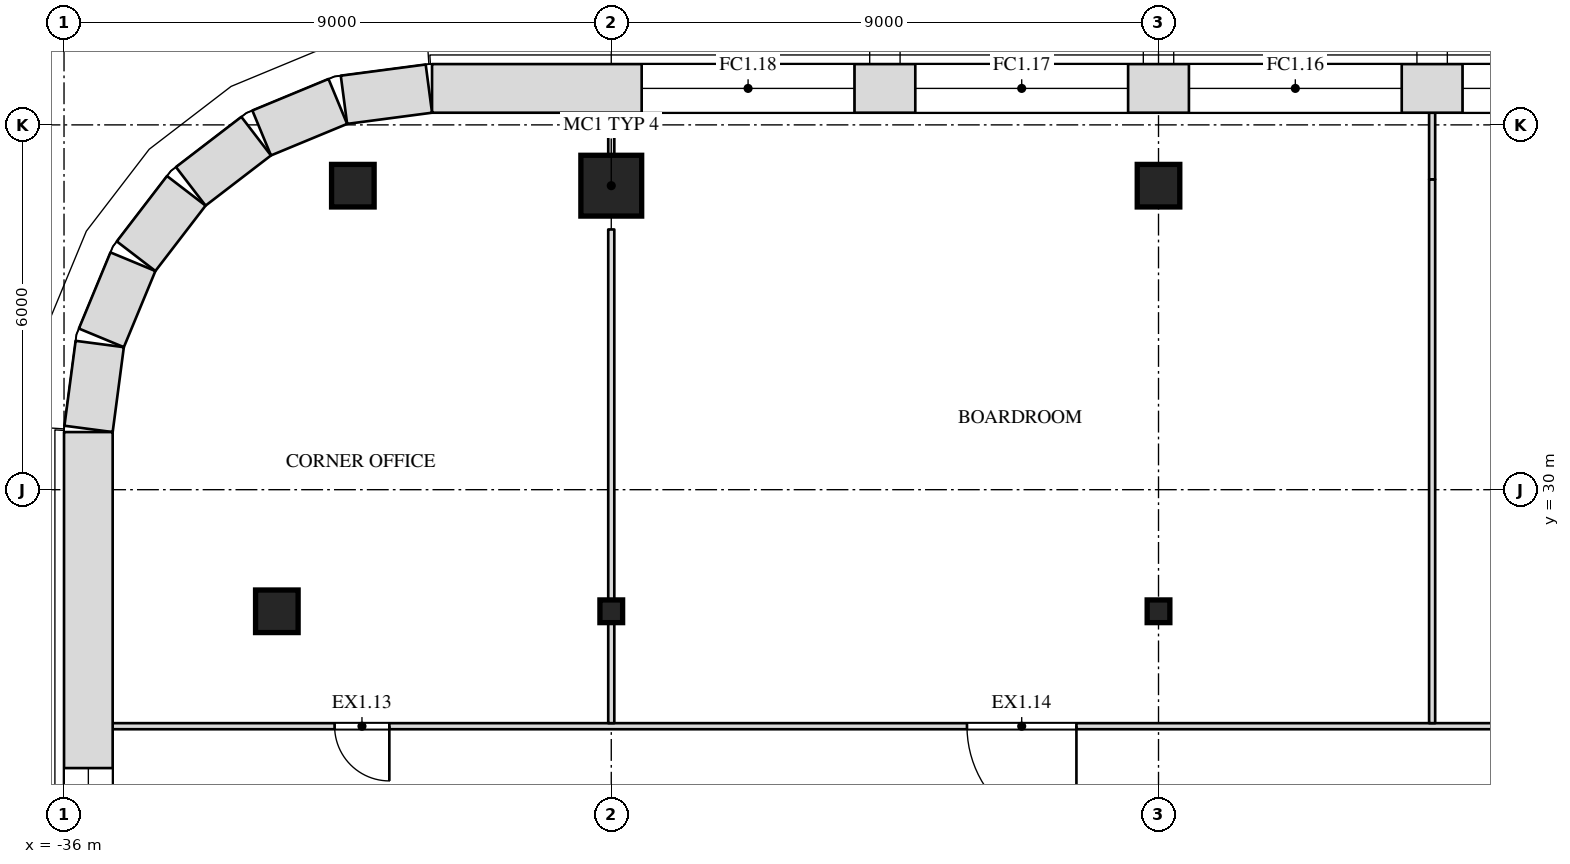
"""IFC4 building model, lengths in metres.
Left out: names, types, materials, properties, quantities, classifications, styles, units other than length and angle.
Written with IfcOpenShell. Run it as: python <this file> out.ifc"""

import sys

from ifc_helpers import new_model, si_unit, direction, frame, frame_2d, origin, origin_2d, place, context, subcontext, project, spatial, rectangle, i_section, extrude, element, fill, save


model = new_model("IFC4")
c1 = context("Model", 3, precision=1e-05, world=origin(), true_north=direction((0.0, 1.0)))
c2 = subcontext(c1, "Body", "Model", "MODEL_VIEW")
j1 = project(units=[si_unit("LENGTHUNIT", "METRE"), si_unit("PLANEANGLEUNIT", "RADIAN")], contexts=[c1])
p1 = place(None, origin())
s1 = spatial("IfcSite", under=j1, at=p1, CompositionType="ELEMENT")
p2 = place(p1, origin())
s2 = spatial("IfcBuilding", under=s1, at=p2, CompositionType="ELEMENT")
p3 = place(p2, frame((0.0, 0.0, 272.5)))
s3 = spatial("IfcBuildingStorey", under=s2, at=p3, CompositionType="ELEMENT", Elevation=272.5)
p4 = place(p3, frame((-32.5, 28.0, 0.0), z_axis=(0.0, 0.0, 1.0), x_axis=(1.0, 0.0, 0.0)))
e1 = element("IfcColumn", 1, at=p4, inside=s3, PredefinedType="COLUMN", context=c2, shape_type="SweptSolid", body=[
    extrude(rectangle(XDim=0.7, YDim=0.7, at=origin_2d()), origin(), (0.0, 0.0, 1.0), 4.0),
])
for number, where, z_axis, x_axis in (
    (2, (-27.0, 28.0, 0.0), (0.0, 0.0, 1.0), (1.0, 0.0, 0.0)),
    (3, (-18.0, 28.0, 0.0), (0.0, 0.0, 1.0), (1.0, 0.0, 0.0)),
):
    element("IfcColumn", number, at=place(p3, frame(where, z_axis=z_axis, x_axis=x_axis)), inside=s3, PredefinedType="COLUMN", context=c2, shape_type="SweptSolid", body=[
        extrude(i_section(OverallWidth=0.373, OverallDepth=0.373, WebThickness=0.016, FlangeThickness=0.026, at=origin_2d()), origin(), (0.0, 0.0, 1.0), 4.0),
    ])
p5 = place(p3, frame((-31.25, 35.0, 0.0), z_axis=(0.0, 0.0, 1.0), x_axis=(1.0, 0.0, 0.0)))
e4 = element("IfcColumn", 4, at=p5, inside=s3, PredefinedType="COLUMN", context=c2, shape_type="SweptSolid", body=[
    extrude(rectangle(XDim=0.7, YDim=0.7, at=origin_2d()), origin(), (0.0, 0.0, 1.0), 4.0),
])
p6 = place(p3, frame((-27.0, 35.0, 0.0), z_axis=(0.0, 0.0, 1.0), x_axis=(1.0, 0.0, 0.0)))
e5 = element("IfcColumn", 5, at=p6, inside=s3, PredefinedType="COLUMN", context=c2, shape_type="SweptSolid", body=[
    extrude(rectangle(XDim=1.0, YDim=1.0, at=origin_2d()), origin(), (0.0, 0.0, 1.0), 4.0),
])
p7 = place(p3, frame((-18.0, 35.0, 0.0), z_axis=(0.0, 0.0, 1.0), x_axis=(1.0, 0.0, 0.0)))
e6 = element("IfcColumn", 6, at=p7, inside=s3, PredefinedType="COLUMN", context=c2, shape_type="SweptSolid", body=[
    extrude(rectangle(XDim=0.7, YDim=0.7, at=origin_2d()), origin(), (0.0, 0.0, 1.0), 4.0),
])
p8 = place(p3, frame((-35.2, 26.11, 0.0), z_axis=(0.0, 0.0, 1.0), x_axis=(1.0, 0.0, 0.0)))
e7 = element("IfcWall", 7, at=p8, inside=s3, PredefinedType="PARTITIONING", context=c2, shape_type="SweptSolid", body=[
    extrude(rectangle(XDim=70.4, YDim=0.1, at=frame_2d((35.2, 0.0))), origin(), (0.0, 0.0, 1.0), 3.78),
])
p9 = place(p8, frame((3.65, 0.0, 0.0)))
e8 = element("IfcOpeningElement", 8, at=p9, cuts=e7, PredefinedType="OPENING", context=c2, shape_type="SweptSolid", body=[
    extrude(rectangle(XDim=0.9, YDim=2.1, at=frame_2d((0.45, 1.05))), frame((0.0, 0.062, 0.0), z_axis=(0.0, -1.0, 0.0), x_axis=(1.0, 0.0, 0.0)), (0.0, 0.0, 1.0), 0.124),
])
p10 = place(p8, frame((14.05, 0.0, 0.0)))
e9 = element("IfcOpeningElement", 9, at=p10, cuts=e7, PredefinedType="OPENING", context=c2, shape_type="SweptSolid", body=[
    extrude(rectangle(XDim=1.8, YDim=2.1, at=frame_2d((0.9, 1.05))), frame((0.0, 0.062, 0.0), z_axis=(0.0, -1.0, 0.0), x_axis=(1.0, 0.0, 0.0)), (0.0, 0.0, 1.0), 0.124),
])
p11 = place(p8, frame((28.0, 0.0, 0.0)))
e10 = element("IfcOpeningElement", 10, at=p11, cuts=e7, PredefinedType="OPENING", context=c2, shape_type="SweptSolid", body=[
    extrude(rectangle(XDim=0.9, YDim=2.1, at=frame_2d((0.45, 1.05))), frame((0.0, 0.062, 0.0), z_axis=(0.0, -1.0, 0.0), x_axis=(1.0, 0.0, 0.0)), (0.0, 0.0, 1.0), 0.124),
])
p12 = place(p8, frame((41.5, 0.0, 0.0)))
e11 = element("IfcOpeningElement", 11, at=p12, cuts=e7, PredefinedType="OPENING", context=c2, shape_type="SweptSolid", body=[
    extrude(rectangle(XDim=0.9, YDim=2.1, at=frame_2d((0.45, 1.05))), frame((0.0, 0.062, 0.0), z_axis=(0.0, -1.0, 0.0), x_axis=(1.0, 0.0, 0.0)), (0.0, 0.0, 1.0), 0.124),
])
p13 = place(p8, frame((54.55, 0.0, 0.0)))
e12 = element("IfcOpeningElement", 12, at=p13, cuts=e7, PredefinedType="OPENING", context=c2, shape_type="SweptSolid", body=[
    extrude(rectangle(XDim=1.8, YDim=2.1, at=frame_2d((0.9, 1.05))), frame((0.0, 0.062, 0.0), z_axis=(0.0, -1.0, 0.0), x_axis=(1.0, 0.0, 0.0)), (0.0, 0.0, 1.0), 0.124),
])
p14 = place(p8, frame((65.85, 0.0, 0.0)))
e13 = element("IfcOpeningElement", 13, at=p14, cuts=e7, PredefinedType="OPENING", context=c2, shape_type="SweptSolid", body=[
    extrude(rectangle(XDim=0.9, YDim=2.1, at=frame_2d((0.45, 1.05))), frame((0.0, 0.062, 0.0), z_axis=(0.0, -1.0, 0.0), x_axis=(1.0, 0.0, 0.0)), (0.0, 0.0, 1.0), 0.124),
])
p15 = place(p3, frame((-27.0, 26.16, 0.0), z_axis=(0.0, 0.0, 1.0), x_axis=(0.0, 1.0, 0.0)))
e14 = element("IfcWall", 14, at=p15, inside=s3, PredefinedType="PARTITIONING", context=c2, shape_type="SweptSolid", body=[
    extrude(rectangle(XDim=1.653, YDim=0.1, at=frame_2d((0.827, 0.0))), origin(), (0.0, 0.0, 1.0), 3.247),
])
p16 = place(p3, frame((-27.0, 28.187, 0.0), z_axis=(0.0, 0.0, 1.0), x_axis=(0.0, 1.0, 0.0)))
e15 = element("IfcWall", 15, at=p16, inside=s3, PredefinedType="PARTITIONING", context=c2, shape_type="SweptSolid", body=[
    extrude(rectangle(XDim=6.093, YDim=0.1, at=frame_2d((3.047, 0.0))), origin(), (0.0, 0.0, 1.0), 3.247),
])
p17 = place(p3, frame((-13.5, 26.16, 0.0), z_axis=(0.0, 0.0, 1.0), x_axis=(0.0, 1.0, 0.0)))
e16 = element("IfcWall", 16, at=p17, inside=s3, PredefinedType="PARTITIONING", context=c2, shape_type="SweptSolid", body=[
    extrude(rectangle(XDim=8.945, YDim=0.1, at=frame_2d((4.472, 0.0))), origin(), (0.0, 0.0, 1.0), 3.247),
])
p18 = place(p3, frame((-13.5, 35.104, 0.0), z_axis=(0.0, 0.0, 1.0), x_axis=(0.0, 1.0, 0.0)))
e17 = element("IfcWall", 17, at=p18, inside=s3, PredefinedType="PARTITIONING", context=c2, shape_type="SweptSolid", body=[
    extrude(rectangle(XDim=1.095, YDim=0.1, at=frame_2d((0.548, 0.0))), origin(), (0.0, 0.0, 1.0), 3.78),
])
p19 = place(p3, frame((-27.0, 35.5, 0.0), z_axis=(0.0, 0.0, 1.0), x_axis=(0.0, 1.0, 0.0)))
e18 = element("IfcWall", 18, at=p19, inside=s3, PredefinedType="PARTITIONING", context=c2, shape_type="SweptSolid", body=[
    extrude(rectangle(XDim=0.7, YDim=0.1, at=frame_2d((0.35, 0.0))), origin(), (0.0, 0.0, 1.0), 3.78),
])
p20 = place(p3, frame((29.948, 36.6, 0.0), z_axis=(0.0, 0.0, 1.0), x_axis=(-1.0, 0.0, 0.0)))
e19 = element("IfcWall", 19, at=p20, inside=s3, PredefinedType="SOLIDWALL", context=c2, shape_type="SweptSolid", body=[
    extrude(rectangle(XDim=59.895, YDim=0.8, at=frame_2d((29.948, 0.0))), origin(), (0.0, 0.0, 1.0), 3.78),
])
p21 = place(p20, frame((3.448, 0.0, 1.0)))
e20 = element("IfcOpeningElement", 20, at=p21, cuts=e19, PredefinedType="OPENING", context=c2, shape_type="SweptSolid", body=[
    extrude(rectangle(XDim=3.5, YDim=2.5, at=frame_2d((1.75, 1.25))), frame((0.0, 0.412, 0.0), z_axis=(0.0, -1.0, 0.0), x_axis=(1.0, 0.0, 0.0)), (0.0, 0.0, 1.0), 0.824),
])
p22 = place(p20, frame((7.948, 0.0, 1.0)))
e21 = element("IfcOpeningElement", 21, at=p22, cuts=e19, PredefinedType="OPENING", context=c2, shape_type="SweptSolid", body=[
    extrude(rectangle(XDim=3.5, YDim=2.5, at=frame_2d((1.75, 1.25))), frame((0.0, 0.412, 0.0), z_axis=(0.0, -1.0, 0.0), x_axis=(1.0, 0.0, 0.0)), (0.0, 0.0, 1.0), 0.824),
])
p23 = place(p20, frame((12.448, 0.0, 1.0)))
e22 = element("IfcOpeningElement", 22, at=p23, cuts=e19, PredefinedType="OPENING", context=c2, shape_type="SweptSolid", body=[
    extrude(rectangle(XDim=3.5, YDim=2.5, at=frame_2d((1.75, 1.25))), frame((0.0, 0.412, 0.0), z_axis=(0.0, -1.0, 0.0), x_axis=(1.0, 0.0, 0.0)), (0.0, 0.0, 1.0), 0.824),
])
p24 = place(p20, frame((16.948, 0.0, 1.0)))
e23 = element("IfcOpeningElement", 23, at=p24, cuts=e19, PredefinedType="OPENING", context=c2, shape_type="SweptSolid", body=[
    extrude(rectangle(XDim=3.5, YDim=2.5, at=frame_2d((1.75, 1.25))), frame((0.0, 0.412, 0.0), z_axis=(0.0, -1.0, 0.0), x_axis=(1.0, 0.0, 0.0)), (0.0, 0.0, 1.0), 0.824),
])
p25 = place(p20, frame((21.448, 0.0, 1.0)))
e24 = element("IfcOpeningElement", 24, at=p25, cuts=e19, PredefinedType="OPENING", context=c2, shape_type="SweptSolid", body=[
    extrude(rectangle(XDim=3.5, YDim=2.5, at=frame_2d((1.75, 1.25))), frame((0.0, 0.412, 0.0), z_axis=(0.0, -1.0, 0.0), x_axis=(1.0, 0.0, 0.0)), (0.0, 0.0, 1.0), 0.824),
])
p26 = place(p20, frame((25.948, 0.0, 1.0)))
e25 = element("IfcOpeningElement", 25, at=p26, cuts=e19, PredefinedType="OPENING", context=c2, shape_type="SweptSolid", body=[
    extrude(rectangle(XDim=3.5, YDim=2.5, at=frame_2d((1.75, 1.25))), frame((0.0, 0.412, 0.0), z_axis=(0.0, -1.0, 0.0), x_axis=(1.0, 0.0, 0.0)), (0.0, 0.0, 1.0), 0.824),
])
p27 = place(p20, frame((30.448, 0.0, 1.0)))
e26 = element("IfcOpeningElement", 26, at=p27, cuts=e19, PredefinedType="OPENING", context=c2, shape_type="SweptSolid", body=[
    extrude(rectangle(XDim=3.5, YDim=2.5, at=frame_2d((1.75, 1.25))), frame((0.0, 0.412, 0.0), z_axis=(0.0, -1.0, 0.0), x_axis=(1.0, 0.0, 0.0)), (0.0, 0.0, 1.0), 0.824),
])
p28 = place(p20, frame((34.948, 0.0, 1.0)))
e27 = element("IfcOpeningElement", 27, at=p28, cuts=e19, PredefinedType="OPENING", context=c2, shape_type="SweptSolid", body=[
    extrude(rectangle(XDim=3.5, YDim=2.5, at=frame_2d((1.75, 1.25))), frame((0.0, 0.412, 0.0), z_axis=(0.0, -1.0, 0.0), x_axis=(1.0, 0.0, 0.0)), (0.0, 0.0, 1.0), 0.824),
])
p29 = place(p20, frame((39.448, 0.0, 1.0)))
e28 = element("IfcOpeningElement", 28, at=p29, cuts=e19, PredefinedType="OPENING", context=c2, shape_type="SweptSolid", body=[
    extrude(rectangle(XDim=3.5, YDim=2.5, at=frame_2d((1.75, 1.25))), frame((0.0, 0.412, 0.0), z_axis=(0.0, -1.0, 0.0), x_axis=(1.0, 0.0, 0.0)), (0.0, 0.0, 1.0), 0.824),
])
p30 = place(p20, frame((43.948, 0.0, 1.0)))
e29 = element("IfcOpeningElement", 29, at=p30, cuts=e19, PredefinedType="OPENING", context=c2, shape_type="SweptSolid", body=[
    extrude(rectangle(XDim=3.5, YDim=2.5, at=frame_2d((1.75, 1.25))), frame((0.0, 0.412, 0.0), z_axis=(0.0, -1.0, 0.0), x_axis=(1.0, 0.0, 0.0)), (0.0, 0.0, 1.0), 0.824),
])
p31 = place(p20, frame((48.448, 0.0, 1.0)))
e30 = element("IfcOpeningElement", 30, at=p31, cuts=e19, PredefinedType="OPENING", context=c2, shape_type="SweptSolid", body=[
    extrude(rectangle(XDim=3.5, YDim=2.5, at=frame_2d((1.75, 1.25))), frame((0.0, 0.412, 0.0), z_axis=(0.0, -1.0, 0.0), x_axis=(1.0, 0.0, 0.0)), (0.0, 0.0, 1.0), 0.824),
])
p32 = place(p20, frame((52.948, 0.0, 1.0)))
e31 = element("IfcOpeningElement", 31, at=p32, cuts=e19, PredefinedType="OPENING", context=c2, shape_type="SweptSolid", body=[
    extrude(rectangle(XDim=3.5, YDim=2.5, at=frame_2d((1.75, 1.25))), frame((0.0, 0.412, 0.0), z_axis=(0.0, -1.0, 0.0), x_axis=(1.0, 0.0, 0.0)), (0.0, 0.0, 1.0), 0.824),
])
p33 = place(p3, frame((-30.0, 36.597, 0.0), z_axis=(0.0, 0.0, 1.0), x_axis=(-0.99144603414, -0.130517283865, 0.0)))
e32 = element("IfcWall", 32, at=p33, inside=s3, PredefinedType="SOLIDWALL", context=c2, shape_type="SweptSolid", body=[
    extrude(rectangle(XDim=1.408, YDim=0.8, at=frame_2d((0.704, 0.0))), origin(), (0.0, 0.0, 1.0), 3.78),
])
p34 = place(p3, frame((-31.497, 36.386, 0.0), z_axis=(0.0, 0.0, 1.0), x_axis=(-0.923847774587, -0.38276009378, 0.0)))
e33 = element("IfcWall", 33, at=p34, inside=s3, PredefinedType="SOLIDWALL", context=c2, shape_type="SweptSolid", body=[
    extrude(rectangle(XDim=1.355, YDim=0.8, at=frame_2d((0.678, 0.0))), origin(), (0.0, 0.0, 1.0), 3.78),
])
for number, where, z_axis, x_axis in (
    (34, (-32.84, 35.815, 0.0), (0.0, 0.0, 1.0), (-0.793, -0.609, 0.0)),
    (35, (-33.989, 34.916, 0.0), (0.0, 0.0, 1.0), (-0.609, -0.793, 0.0)),
):
    element("IfcWall", number, at=place(p3, frame(where, z_axis=z_axis, x_axis=x_axis)), inside=s3, PredefinedType="SOLIDWALL", context=c2, shape_type="SweptSolid", body=[
        extrude(rectangle(XDim=1.356, YDim=0.8, at=frame_2d((0.678, 0.0))), origin(), (0.0, 0.0, 1.0), 3.78),
    ])
p35 = place(p3, frame((-34.867, 33.75, 0.0), z_axis=(0.0, 0.0, 1.0), x_axis=(-0.38276009378, -0.923847774587, 0.0)))
e36 = element("IfcWall", 36, at=p35, inside=s3, PredefinedType="SOLIDWALL", context=c2, shape_type="SweptSolid", body=[
    extrude(rectangle(XDim=1.355, YDim=0.8, at=frame_2d((0.678, 0.0))), origin(), (0.0, 0.0, 1.0), 3.78),
])
p36 = place(p3, frame((-35.413, 32.396, 0.0), z_axis=(0.0, 0.0, 1.0), x_axis=(-0.130517283865, -0.99144603414, 0.0)))
e37 = element("IfcWall", 37, at=p36, inside=s3, PredefinedType="SOLIDWALL", context=c2, shape_type="SweptSolid", body=[
    extrude(rectangle(XDim=1.408, YDim=0.8, at=frame_2d((0.704, 0.0))), origin(), (0.0, 0.0, 1.0), 3.78),
])
p37 = place(p3, frame((-35.6, 30.948, 0.0), z_axis=(0.0, 0.0, 1.0), x_axis=(0.0, -1.0, 0.0)))
e38 = element("IfcWall", 38, at=p37, inside=s3, PredefinedType="SOLIDWALL", context=c2, shape_type="SweptSolid", body=[
    extrude(rectangle(XDim=38.895, YDim=0.8, at=frame_2d((19.448, 0.0))), origin(), (0.0, 0.0, 1.0), 3.78),
])
p38 = place(p37, frame((5.526, 0.0, 1.0)))
e39 = element("IfcOpeningElement", 39, at=p38, cuts=e38, PredefinedType="OPENING", context=c2, shape_type="SweptSolid", body=[
    extrude(rectangle(XDim=3.5, YDim=2.5, at=frame_2d((1.75, 1.25))), frame((0.0, 0.412, 0.0), z_axis=(0.0, -1.0, 0.0), x_axis=(1.0, 0.0, 0.0)), (0.0, 0.0, 1.0), 0.824),
])
p39 = place(p37, frame((10.395, 0.0, 1.0)))
e40 = element("IfcOpeningElement", 40, at=p39, cuts=e38, PredefinedType="OPENING", context=c2, shape_type="SweptSolid", body=[
    extrude(rectangle(XDim=3.5, YDim=2.5, at=frame_2d((1.75, 1.25))), frame((0.0, 0.412, 0.0), z_axis=(0.0, -1.0, 0.0), x_axis=(1.0, 0.0, 0.0)), (0.0, 0.0, 1.0), 0.824),
])
p40 = place(p37, frame((15.263, 0.0, 1.0)))
e41 = element("IfcOpeningElement", 41, at=p40, cuts=e38, PredefinedType="OPENING", context=c2, shape_type="SweptSolid", body=[
    extrude(rectangle(XDim=3.5, YDim=2.5, at=frame_2d((1.75, 1.25))), frame((0.0, 0.412, 0.0), z_axis=(0.0, -1.0, 0.0), x_axis=(1.0, 0.0, 0.0)), (0.0, 0.0, 1.0), 0.824),
])
p41 = place(p37, frame((20.132, 0.0, 1.0)))
e42 = element("IfcOpeningElement", 42, at=p41, cuts=e38, PredefinedType="OPENING", context=c2, shape_type="SweptSolid", body=[
    extrude(rectangle(XDim=3.5, YDim=2.5, at=frame_2d((1.75, 1.25))), frame((0.0, 0.412, 0.0), z_axis=(0.0, -1.0, 0.0), x_axis=(1.0, 0.0, 0.0)), (0.0, 0.0, 1.0), 0.824),
])
p42 = place(p37, frame((25.0, 0.0, 1.0)))
e43 = element("IfcOpeningElement", 43, at=p42, cuts=e38, PredefinedType="OPENING", context=c2, shape_type="SweptSolid", body=[
    extrude(rectangle(XDim=3.5, YDim=2.5, at=frame_2d((1.75, 1.25))), frame((0.0, 0.412, 0.0), z_axis=(0.0, -1.0, 0.0), x_axis=(1.0, 0.0, 0.0)), (0.0, 0.0, 1.0), 0.824),
])
p43 = place(p37, frame((29.869, 0.0, 1.0)))
e44 = element("IfcOpeningElement", 44, at=p43, cuts=e38, PredefinedType="OPENING", context=c2, shape_type="SweptSolid", body=[
    extrude(rectangle(XDim=3.5, YDim=2.5, at=frame_2d((1.75, 1.25))), frame((0.0, 0.412, 0.0), z_axis=(0.0, -1.0, 0.0), x_axis=(1.0, 0.0, 0.0)), (0.0, 0.0, 1.0), 0.824),
])
p44 = place(p9, origin())
e45 = element("IfcDoor", 45, at=p44, inside=s3, OperationType="SINGLE_SWING_LEFT", PredefinedType="DOOR", context=c2, shape_type="SweptSolid", body=[
    extrude(rectangle(XDim=0.9, YDim=2.1, at=frame_2d((0.45, 1.05))), frame((0.0, 0.025, 0.0), z_axis=(0.0, -1.0, 0.0), x_axis=(1.0, 0.0, 0.0)), (0.0, 0.0, 1.0), 0.05),
])
fill(e8, e45)
p45 = place(p10, origin())
e46 = element("IfcDoor", 46, at=p45, inside=s3, OperationType="DOUBLE_DOOR_SINGLE_SWING", PredefinedType="DOOR", context=c2, shape_type="SweptSolid", body=[
    extrude(rectangle(XDim=1.8, YDim=2.1, at=frame_2d((0.9, 1.05))), frame((0.0, 0.025, 0.0), z_axis=(0.0, -1.0, 0.0), x_axis=(1.0, 0.0, 0.0)), (0.0, 0.0, 1.0), 0.05),
])
fill(e9, e46)
p46 = place(p29, origin())
e47 = element("IfcWindow", 47, at=p46, inside=s3, PartitioningType="SINGLE_PANEL", PredefinedType="WINDOW", context=c2, shape_type="SweptSolid", body=[
    extrude(rectangle(XDim=3.5, YDim=2.5, at=frame_2d((1.75, 1.25))), frame((0.0, 0.03, 0.0), z_axis=(0.0, -1.0, 0.0), x_axis=(1.0, 0.0, 0.0)), (0.0, 0.0, 1.0), 0.06),
])
fill(e28, e47)
p47 = place(p30, origin())
e48 = element("IfcWindow", 48, at=p47, inside=s3, PartitioningType="SINGLE_PANEL", PredefinedType="WINDOW", context=c2, shape_type="SweptSolid", body=[
    extrude(rectangle(XDim=3.5, YDim=2.5, at=frame_2d((1.75, 1.25))), frame((0.0, 0.03, 0.0), z_axis=(0.0, -1.0, 0.0), x_axis=(1.0, 0.0, 0.0)), (0.0, 0.0, 1.0), 0.06),
])
fill(e29, e48)
p48 = place(p31, origin())
e49 = element("IfcWindow", 49, at=p48, inside=s3, PartitioningType="SINGLE_PANEL", PredefinedType="WINDOW", context=c2, shape_type="SweptSolid", body=[
    extrude(rectangle(XDim=3.5, YDim=2.5, at=frame_2d((1.75, 1.25))), frame((0.0, 0.03, 0.0), z_axis=(0.0, -1.0, 0.0), x_axis=(1.0, 0.0, 0.0)), (0.0, 0.0, 1.0), 0.06),
])
fill(e30, e49)
p49 = place(p32, origin())
e50 = element("IfcWindow", 50, at=p49, inside=s3, PartitioningType="SINGLE_PANEL", PredefinedType="WINDOW", context=c2, shape_type="SweptSolid", body=[
    extrude(rectangle(XDim=3.5, YDim=2.5, at=frame_2d((1.75, 1.25))), frame((0.0, 0.03, 0.0), z_axis=(0.0, -1.0, 0.0), x_axis=(1.0, 0.0, 0.0)), (0.0, 0.0, 1.0), 0.06),
])
fill(e31, e50)
p50 = place(p38, origin())
e51 = element("IfcWindow", 51, at=p50, inside=s3, PartitioningType="SINGLE_PANEL", PredefinedType="WINDOW", context=c2, shape_type="SweptSolid", body=[
    extrude(rectangle(XDim=3.5, YDim=2.5, at=frame_2d((1.75, 1.25))), frame((0.0, 0.03, 0.0), z_axis=(0.0, -1.0, 0.0), x_axis=(1.0, 0.0, 0.0)), (0.0, 0.0, 1.0), 0.06),
])
fill(e39, e51)
save(model, sys.argv[1])
